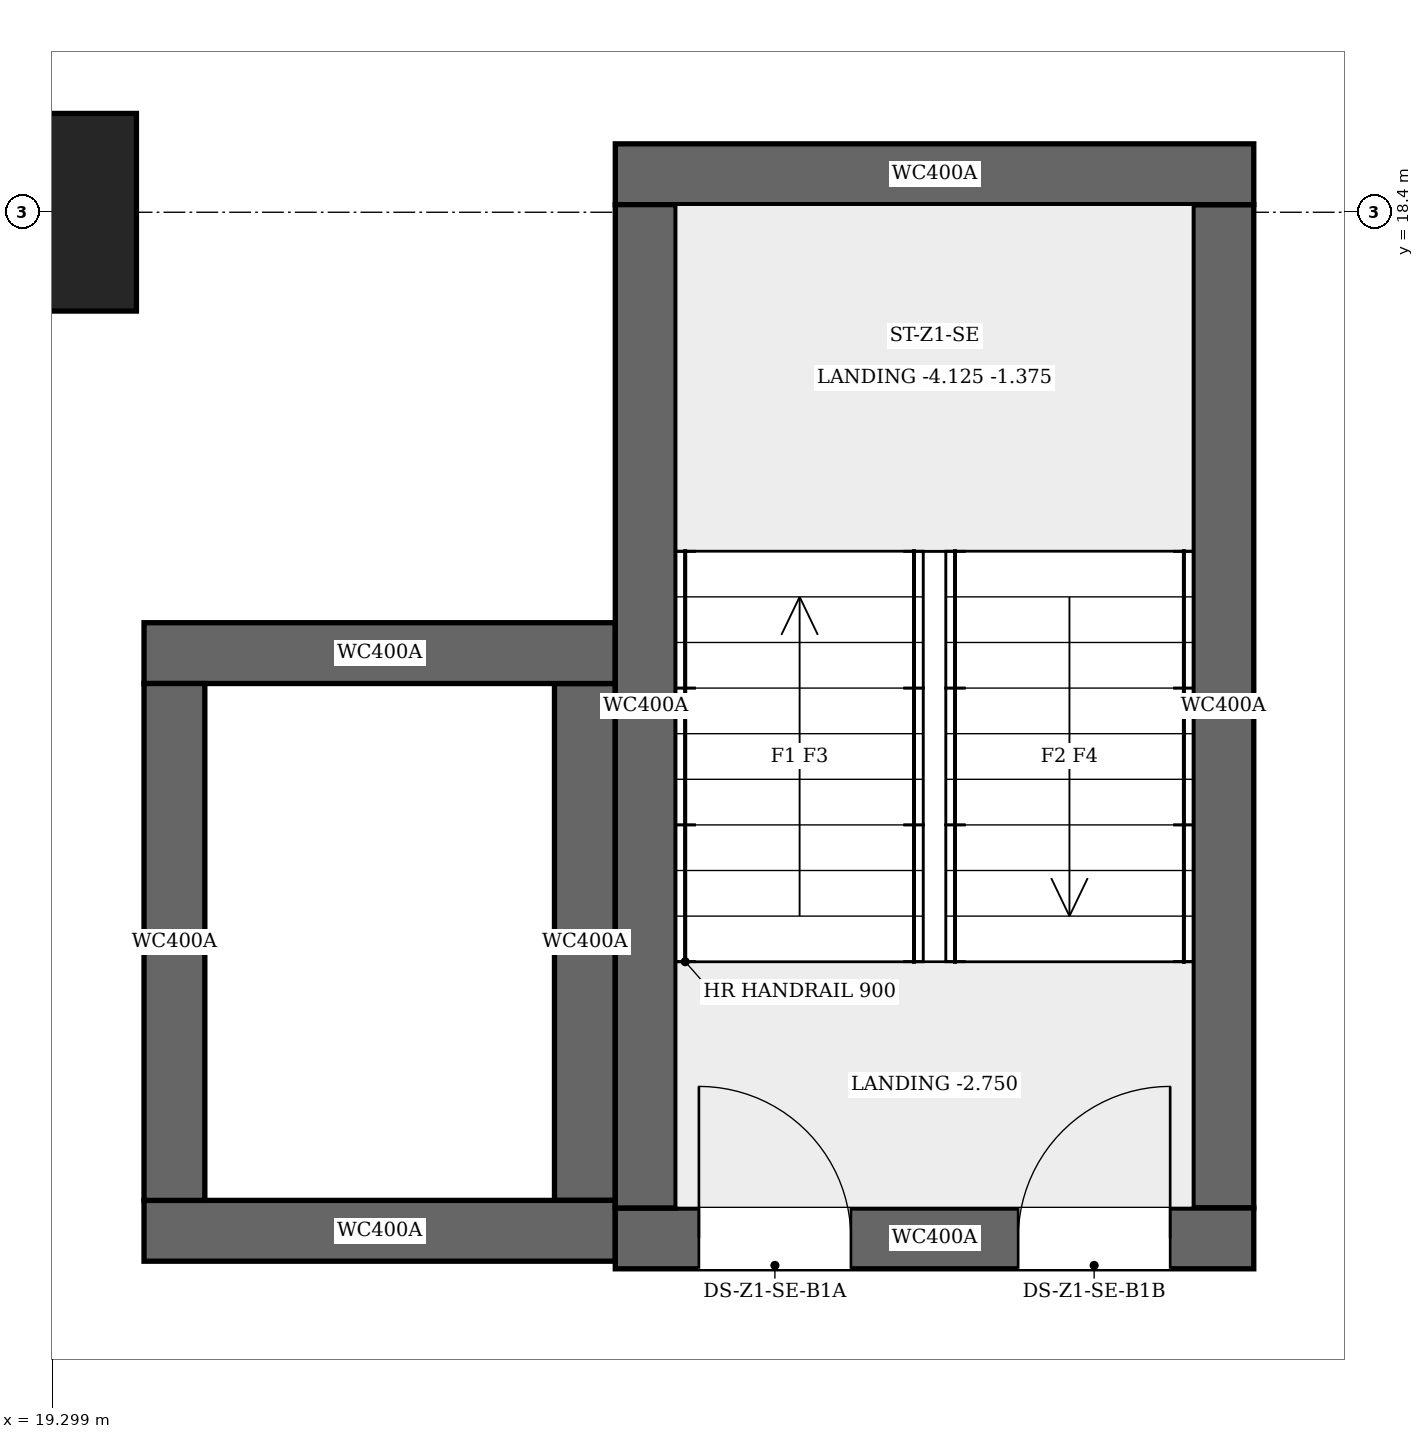
"""IFC4 building model, lengths in metres.
Left out: names, types, materials, properties, quantities, classifications, styles, units other than length and angle.
Written with IfcOpenShell. Run it as: python <this file> out.ifc"""

import sys

from ifc_helpers import new_model, si_unit, direction, frame, frame_2d, origin, origin_2d, place, context, subcontext, project, spatial, rectangle, extrude, element, fill, save


model = new_model("IFC4")
c1 = context("Model", 3, precision=1e-05, world=origin(), true_north=direction((0.0, 1.0)))
c2 = subcontext(c1, "Body", "Model", "MODEL_VIEW")
j1 = project(units=[si_unit("LENGTHUNIT", "METRE"), si_unit("PLANEANGLEUNIT", "RADIAN")], contexts=[c1])
p1 = place(None, origin())
s1 = spatial("IfcSite", under=j1, at=p1, CompositionType="ELEMENT")
p2 = place(p1, origin())
s2 = spatial("IfcBuilding", under=s1, at=p2, CompositionType="ELEMENT")
p3 = place(p2, frame((0.0, 0.0, -5.5)))
s3 = spatial("IfcBuildingStorey", under=s2, at=p3, CompositionType="ELEMENT", Elevation=-5.5)
p4 = place(p3, frame((23.0, 11.65, 0.0), z_axis=(0.0, 0.0, 1.0), x_axis=(1.0, 0.0, 0.0)))
e1 = element("IfcWall", 1, at=p4, inside=s3, PredefinedType="SHEAR", context=c2, shape_type="SweptSolid", body=[
    extrude(rectangle(XDim=4.2, YDim=0.4, at=frame_2d((2.1, 0.0))), origin(), (0.0, 0.0, 1.0), 5.5),
])
p5 = place(p4, frame((0.55, 0.0, 0.0)))
e2 = element("IfcOpeningElement", 2, at=p5, cuts=e1, PredefinedType="OPENING", context=c2, shape_type="SweptSolid", body=[
    extrude(rectangle(XDim=1.0, YDim=2.1, at=frame_2d((0.5, 1.05))), frame((0.0, 0.21, 0.0), z_axis=(0.0, -1.0, 0.0), x_axis=(1.0, 0.0, 0.0)), (0.0, 0.0, 1.0), 0.42),
])
p6 = place(p4, frame((2.65, 0.0, 0.0)))
e3 = element("IfcOpeningElement", 3, at=p6, cuts=e1, PredefinedType="OPENING", context=c2, shape_type="SweptSolid", body=[
    extrude(rectangle(XDim=1.0, YDim=2.1, at=frame_2d((0.5, 1.05))), frame((0.0, 0.21, 0.0), z_axis=(0.0, -1.0, 0.0), x_axis=(1.0, 0.0, 0.0)), (0.0, 0.0, 1.0), 0.42),
])
p7 = place(p3, frame((23.0, 18.65, 0.0), z_axis=(0.0, 0.0, 1.0), x_axis=(1.0, 0.0, 0.0)))
e4 = element("IfcWall", 4, at=p7, inside=s3, PredefinedType="SHEAR", context=c2, shape_type="SweptSolid", body=[
    extrude(rectangle(XDim=4.2, YDim=0.4, at=frame_2d((2.1, 0.0))), origin(), (0.0, 0.0, 1.0), 5.5),
])
for number, where, z_axis, x_axis in (
    (5, (23.2, 11.85, 0.0), (0.0, 0.0, 1.0), (0.0, 1.0, 0.0)),
    (6, (27.0, 11.85, 0.0), (0.0, 0.0, 1.0), (0.0, 1.0, 0.0)),
):
    element("IfcWall", number, at=place(p3, frame(where, z_axis=z_axis, x_axis=x_axis)), inside=s3, PredefinedType="SHEAR", context=c2, shape_type="SweptSolid", body=[
        extrude(rectangle(XDim=6.6, YDim=0.4, at=frame_2d((3.3, 0.0))), origin(), (0.0, 0.0, 1.0), 5.5),
    ])
for number, where, z_axis, x_axis in (
    (7, (19.9, 11.7, 0.0), (0.0, 0.0, 1.0), (1.0, 0.0, 0.0)),
    (8, (19.9, 15.5, 0.0), (0.0, 0.0, 1.0), (1.0, 0.0, 0.0)),
):
    element("IfcWall", number, at=place(p3, frame(where, z_axis=z_axis, x_axis=x_axis)), inside=s3, PredefinedType="SHEAR", context=c2, shape_type="SweptSolid", body=[
        extrude(rectangle(XDim=3.1, YDim=0.4, at=frame_2d((1.55, 0.0))), origin(), (0.0, 0.0, 1.0), 5.5),
    ])
for number, where, z_axis, x_axis in (
    (9, (20.1, 11.9, 0.0), (0.0, 0.0, 1.0), (0.0, 1.0, 0.0)),
    (10, (22.8, 11.9, 0.0), (0.0, 0.0, 1.0), (0.0, 1.0, 0.0)),
):
    element("IfcWall", number, at=place(p3, frame(where, z_axis=z_axis, x_axis=x_axis)), inside=s3, PredefinedType="SHEAR", context=c2, shape_type="SweptSolid", body=[
        extrude(rectangle(XDim=3.4, YDim=0.4, at=frame_2d((1.7, 0.0))), origin(), (0.0, 0.0, 1.0), 5.5),
    ])
p8 = place(p3, frame((19.2, 18.4, 0.0), z_axis=(0.0, 0.0, 1.0), x_axis=(1.0, 0.0, 0.0)))
e11 = element("IfcColumn", 11, at=p8, inside=s3, PredefinedType="COLUMN", context=c2, shape_type="SweptSolid", body=[
    extrude(rectangle(XDim=1.3, YDim=1.3, at=origin_2d()), origin(), (0.0, 0.0, 1.0), 5.5),
])
p9 = place(p5, origin())
e12 = element("IfcDoor", 12, at=p9, inside=s3, OperationType="SINGLE_SWING_RIGHT", PredefinedType="DOOR", context=c2, shape_type="SweptSolid", body=[
    extrude(rectangle(XDim=1.0, YDim=2.1, at=frame_2d((0.5, 1.05))), frame((0.0, 0.025, 0.0), z_axis=(0.0, -1.0, 0.0), x_axis=(1.0, 0.0, 0.0)), (0.0, 0.0, 1.0), 0.05),
])
fill(e2, e12)
p10 = place(p6, origin())
e13 = element("IfcDoor", 13, at=p10, inside=s3, OperationType="SINGLE_SWING_LEFT", PredefinedType="DOOR", context=c2, shape_type="SweptSolid", body=[
    extrude(rectangle(XDim=1.0, YDim=2.1, at=frame_2d((0.5, 1.05))), frame((0.0, 0.025, 0.0), z_axis=(0.0, -1.0, 0.0), x_axis=(1.0, 0.0, 0.0)), (0.0, 0.0, 1.0), 0.05),
])
fill(e3, e13)
save(model, sys.argv[1])
